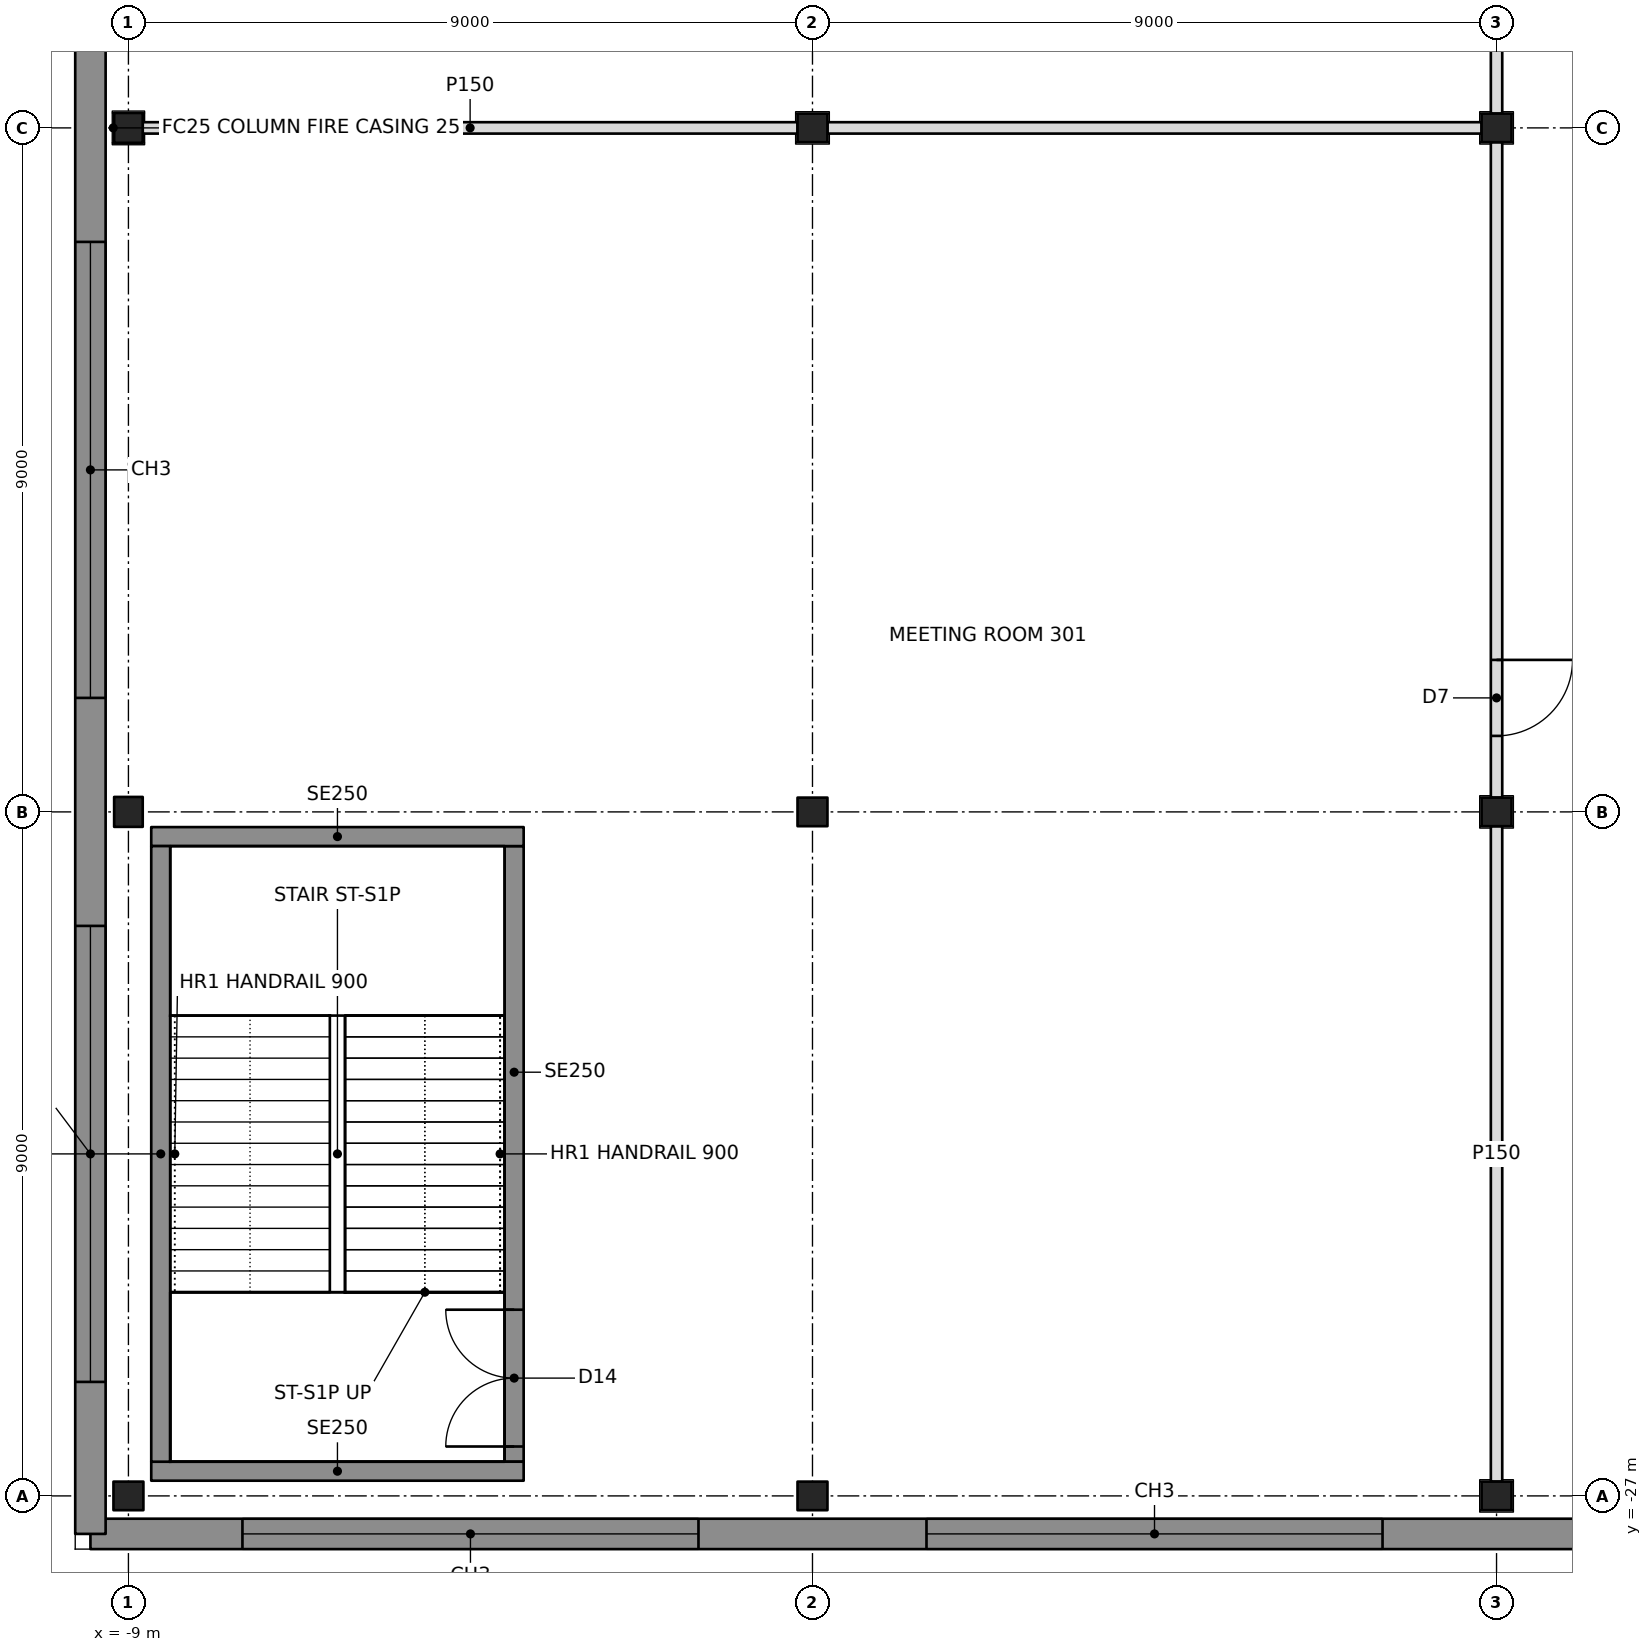
"""IFC4 building model, lengths in metres.
Left out: names, types, materials, properties, quantities, classifications, styles, units other than length and angle.
Written with IfcOpenShell. Run it as: python <this file> out.ifc"""

import sys

from ifc_helpers import new_model, si_unit, direction, frame, frame_2d, origin, origin_2d, place, context, subcontext, project, spatial, rectangle, i_section, extrude, element, fill, save


model = new_model("IFC4")
c1 = context("Model", 3, precision=1e-05, world=origin(), true_north=direction((0.0, 1.0)))
c2 = subcontext(c1, "Body", "Model", "MODEL_VIEW")
j1 = project(units=[si_unit("LENGTHUNIT", "METRE"), si_unit("PLANEANGLEUNIT", "RADIAN")], contexts=[c1])
p1 = place(None, origin())
s1 = spatial("IfcSite", under=j1, at=p1, CompositionType="ELEMENT")
p2 = place(p1, origin())
s2 = spatial("IfcBuilding", under=s1, at=p2, CompositionType="ELEMENT")
p3 = place(p2, frame((0.0, 0.0, 16.0)))
s3 = spatial("IfcBuildingStorey", under=s2, at=p3, CompositionType="ELEMENT", Elevation=16.0)
for number, where, z_axis, x_axis in (
    (1, (-9.0, -27.0, 0.0), (0.0, 0.0, 1.0), (1.0, 0.0, 0.0)),
    (2, (-9.0, -18.0, 0.0), (0.0, 0.0, 1.0), (0.0, 1.0, 0.0)),
    (3, (-9.0, -9.0, 0.0), (0.0, 0.0, 1.0), (0.0, 1.0, 0.0)),
    (4, (0.0, -27.0, 0.0), (0.0, 0.0, 1.0), (1.0, 0.0, 0.0)),
    (5, (0.0, -18.0, 0.0), (0.0, 0.0, 1.0), (1.0, 0.0, 0.0)),
    (6, (0.0, -9.0, 0.0), (0.0, 0.0, 1.0), (1.0, 0.0, 0.0)),
    (7, (9.0, -27.0, 0.0), (0.0, 0.0, 1.0), (1.0, 0.0, 0.0)),
    (8, (9.0, -18.0, 0.0), (0.0, 0.0, 1.0), (1.0, 0.0, 0.0)),
    (9, (9.0, -9.0, 0.0), (0.0, 0.0, 1.0), (1.0, 0.0, 0.0)),
):
    element("IfcColumn", number, at=place(p3, frame(where, z_axis=z_axis, x_axis=x_axis)), inside=s3, PredefinedType="COLUMN", context=c2, shape_type="SweptSolid", body=[
        extrude(i_section(OverallWidth=0.394, OverallDepth=0.376, WebThickness=0.017, FlangeThickness=0.028, at=origin_2d()), origin(), (0.0, 0.0, 1.0), 7.0),
    ])
p4 = place(p3, frame((-9.5, -27.5, 0.0), z_axis=(0.0, 0.0, 1.0), x_axis=(1.0, 0.0, 0.0)))
e10 = element("IfcWall", 10, at=p4, inside=s3, PredefinedType="SOLIDWALL", context=c2, shape_type="SweptSolid", body=[
    extrude(rectangle(XDim=73.0, YDim=0.4, at=frame_2d((36.5, 0.0))), origin(), (0.0, 0.0, 1.0), 6.7),
])
p5 = place(p4, frame((2.0, 0.0, 0.9)))
e11 = element("IfcOpeningElement", 11, at=p5, cuts=e10, PredefinedType="OPENING", context=c2, shape_type="SweptSolid", body=[
    extrude(rectangle(XDim=6.0, YDim=2.6, at=frame_2d((3.0, 1.3))), frame((0.0, 0.21, 0.0), z_axis=(0.0, -1.0, 0.0), x_axis=(1.0, 0.0, 0.0)), (0.0, 0.0, 1.0), 0.42),
])
p6 = place(p4, frame((11.0, 0.0, 0.9)))
e12 = element("IfcOpeningElement", 12, at=p6, cuts=e10, PredefinedType="OPENING", context=c2, shape_type="SweptSolid", body=[
    extrude(rectangle(XDim=6.0, YDim=2.6, at=frame_2d((3.0, 1.3))), frame((0.0, 0.21, 0.0), z_axis=(0.0, -1.0, 0.0), x_axis=(1.0, 0.0, 0.0)), (0.0, 0.0, 1.0), 0.42),
])
p7 = place(p4, frame((20.0, 0.0, 0.9)))
e13 = element("IfcOpeningElement", 13, at=p7, cuts=e10, PredefinedType="OPENING", context=c2, shape_type="SweptSolid", body=[
    extrude(rectangle(XDim=6.0, YDim=2.6, at=frame_2d((3.0, 1.3))), frame((0.0, 0.21, 0.0), z_axis=(0.0, -1.0, 0.0), x_axis=(1.0, 0.0, 0.0)), (0.0, 0.0, 1.0), 0.42),
])
p8 = place(p4, frame((29.0, 0.0, 0.9)))
e14 = element("IfcOpeningElement", 14, at=p8, cuts=e10, PredefinedType="OPENING", context=c2, shape_type="SweptSolid", body=[
    extrude(rectangle(XDim=6.0, YDim=2.6, at=frame_2d((3.0, 1.3))), frame((0.0, 0.21, 0.0), z_axis=(0.0, -1.0, 0.0), x_axis=(1.0, 0.0, 0.0)), (0.0, 0.0, 1.0), 0.42),
])
p9 = place(p4, frame((38.0, 0.0, 0.9)))
e15 = element("IfcOpeningElement", 15, at=p9, cuts=e10, PredefinedType="OPENING", context=c2, shape_type="SweptSolid", body=[
    extrude(rectangle(XDim=6.0, YDim=2.6, at=frame_2d((3.0, 1.3))), frame((0.0, 0.21, 0.0), z_axis=(0.0, -1.0, 0.0), x_axis=(1.0, 0.0, 0.0)), (0.0, 0.0, 1.0), 0.42),
])
p10 = place(p4, frame((47.0, 0.0, 0.9)))
e16 = element("IfcOpeningElement", 16, at=p10, cuts=e10, PredefinedType="OPENING", context=c2, shape_type="SweptSolid", body=[
    extrude(rectangle(XDim=6.0, YDim=2.6, at=frame_2d((3.0, 1.3))), frame((0.0, 0.21, 0.0), z_axis=(0.0, -1.0, 0.0), x_axis=(1.0, 0.0, 0.0)), (0.0, 0.0, 1.0), 0.42),
])
p11 = place(p4, frame((56.0, 0.0, 0.9)))
e17 = element("IfcOpeningElement", 17, at=p11, cuts=e10, PredefinedType="OPENING", context=c2, shape_type="SweptSolid", body=[
    extrude(rectangle(XDim=6.0, YDim=2.6, at=frame_2d((3.0, 1.3))), frame((0.0, 0.21, 0.0), z_axis=(0.0, -1.0, 0.0), x_axis=(1.0, 0.0, 0.0)), (0.0, 0.0, 1.0), 0.42),
])
p12 = place(p4, frame((65.0, 0.0, 0.9)))
e18 = element("IfcOpeningElement", 18, at=p12, cuts=e10, PredefinedType="OPENING", context=c2, shape_type="SweptSolid", body=[
    extrude(rectangle(XDim=6.0, YDim=2.6, at=frame_2d((3.0, 1.3))), frame((0.0, 0.21, 0.0), z_axis=(0.0, -1.0, 0.0), x_axis=(1.0, 0.0, 0.0)), (0.0, 0.0, 1.0), 0.42),
])
p13 = place(p3, frame((-9.5, 45.5, 0.0), z_axis=(0.0, 0.0, 1.0), x_axis=(0.0, -1.0, 0.0)))
e19 = element("IfcWall", 19, at=p13, inside=s3, PredefinedType="SOLIDWALL", context=c2, shape_type="SweptSolid", body=[
    extrude(rectangle(XDim=73.0, YDim=0.4, at=frame_2d((36.5, 0.0))), origin(), (0.0, 0.0, 1.0), 6.7),
])
p14 = place(p13, frame((2.0, 0.0, 0.9)))
e20 = element("IfcOpeningElement", 20, at=p14, cuts=e19, PredefinedType="OPENING", context=c2, shape_type="SweptSolid", body=[
    extrude(rectangle(XDim=6.0, YDim=2.6, at=frame_2d((3.0, 1.3))), frame((0.0, 0.21, 0.0), z_axis=(0.0, -1.0, 0.0), x_axis=(1.0, 0.0, 0.0)), (0.0, 0.0, 1.0), 0.42),
])
p15 = place(p13, frame((11.0, 0.0, 0.9)))
e21 = element("IfcOpeningElement", 21, at=p15, cuts=e19, PredefinedType="OPENING", context=c2, shape_type="SweptSolid", body=[
    extrude(rectangle(XDim=6.0, YDim=2.6, at=frame_2d((3.0, 1.3))), frame((0.0, 0.21, 0.0), z_axis=(0.0, -1.0, 0.0), x_axis=(1.0, 0.0, 0.0)), (0.0, 0.0, 1.0), 0.42),
])
p16 = place(p13, frame((20.0, 0.0, 0.9)))
e22 = element("IfcOpeningElement", 22, at=p16, cuts=e19, PredefinedType="OPENING", context=c2, shape_type="SweptSolid", body=[
    extrude(rectangle(XDim=6.0, YDim=2.6, at=frame_2d((3.0, 1.3))), frame((0.0, 0.21, 0.0), z_axis=(0.0, -1.0, 0.0), x_axis=(1.0, 0.0, 0.0)), (0.0, 0.0, 1.0), 0.42),
])
p17 = place(p13, frame((29.0, 0.0, 0.9)))
e23 = element("IfcOpeningElement", 23, at=p17, cuts=e19, PredefinedType="OPENING", context=c2, shape_type="SweptSolid", body=[
    extrude(rectangle(XDim=6.0, YDim=2.6, at=frame_2d((3.0, 1.3))), frame((0.0, 0.21, 0.0), z_axis=(0.0, -1.0, 0.0), x_axis=(1.0, 0.0, 0.0)), (0.0, 0.0, 1.0), 0.42),
])
p18 = place(p13, frame((38.0, 0.0, 0.9)))
e24 = element("IfcOpeningElement", 24, at=p18, cuts=e19, PredefinedType="OPENING", context=c2, shape_type="SweptSolid", body=[
    extrude(rectangle(XDim=6.0, YDim=2.6, at=frame_2d((3.0, 1.3))), frame((0.0, 0.21, 0.0), z_axis=(0.0, -1.0, 0.0), x_axis=(1.0, 0.0, 0.0)), (0.0, 0.0, 1.0), 0.42),
])
p19 = place(p13, frame((47.0, 0.0, 0.9)))
e25 = element("IfcOpeningElement", 25, at=p19, cuts=e19, PredefinedType="OPENING", context=c2, shape_type="SweptSolid", body=[
    extrude(rectangle(XDim=6.0, YDim=2.6, at=frame_2d((3.0, 1.3))), frame((0.0, 0.21, 0.0), z_axis=(0.0, -1.0, 0.0), x_axis=(1.0, 0.0, 0.0)), (0.0, 0.0, 1.0), 0.42),
])
p20 = place(p13, frame((56.0, 0.0, 0.9)))
e26 = element("IfcOpeningElement", 26, at=p20, cuts=e19, PredefinedType="OPENING", context=c2, shape_type="SweptSolid", body=[
    extrude(rectangle(XDim=6.0, YDim=2.6, at=frame_2d((3.0, 1.3))), frame((0.0, 0.21, 0.0), z_axis=(0.0, -1.0, 0.0), x_axis=(1.0, 0.0, 0.0)), (0.0, 0.0, 1.0), 0.42),
])
p21 = place(p13, frame((65.0, 0.0, 0.9)))
e27 = element("IfcOpeningElement", 27, at=p21, cuts=e19, PredefinedType="OPENING", context=c2, shape_type="SweptSolid", body=[
    extrude(rectangle(XDim=6.0, YDim=2.6, at=frame_2d((3.0, 1.3))), frame((0.0, 0.21, 0.0), z_axis=(0.0, -1.0, 0.0), x_axis=(1.0, 0.0, 0.0)), (0.0, 0.0, 1.0), 0.42),
])
p22 = place(p3, frame((-8.812, -9.0, 0.0), z_axis=(0.0, 0.0, 1.0), x_axis=(1.0, 0.0, 0.0)))
e28 = element("IfcWall", 28, at=p22, inside=s3, PredefinedType="PARTITIONING", context=c2, shape_type="SweptSolid", body=[
    extrude(rectangle(XDim=8.615, YDim=0.15, at=frame_2d((4.308, 0.0))), origin(), (0.0, 0.0, 1.0), 5.753),
])
p23 = place(p3, frame((0.197, -9.0, 0.0), z_axis=(0.0, 0.0, 1.0), x_axis=(1.0, 0.0, 0.0)))
e29 = element("IfcWall", 29, at=p23, inside=s3, PredefinedType="PARTITIONING", context=c2, shape_type="SweptSolid", body=[
    extrude(rectangle(XDim=8.606, YDim=0.15, at=frame_2d((4.303, 0.0))), origin(), (0.0, 0.0, 1.0), 5.753),
])
p24 = place(p3, frame((9.0, -9.188, 0.0), z_axis=(0.0, 0.0, 1.0), x_axis=(0.0, -1.0, 0.0)))
e30 = element("IfcWall", 30, at=p24, inside=s3, PredefinedType="PARTITIONING", context=c2, shape_type="SweptSolid", body=[
    extrude(rectangle(XDim=8.624, YDim=0.15, at=frame_2d((4.312, 0.0))), origin(), (0.0, 0.0, 1.0), 5.753),
])
p25 = place(p24, frame((6.812, 0.0, 0.0)))
e31 = element("IfcOpeningElement", 31, at=p25, cuts=e30, PredefinedType="OPENING", context=c2, shape_type="SweptSolid", body=[
    extrude(rectangle(XDim=1.0, YDim=2.1, at=frame_2d((0.5, 1.05))), frame((0.0, 0.085, 0.0), z_axis=(0.0, -1.0, 0.0), x_axis=(1.0, 0.0, 0.0)), (0.0, 0.0, 1.0), 0.17),
])
p26 = place(p3, frame((9.0, -18.188, 0.0), z_axis=(0.0, 0.0, 1.0), x_axis=(0.0, -1.0, 0.0)))
e32 = element("IfcWall", 32, at=p26, inside=s3, PredefinedType="PARTITIONING", context=c2, shape_type="SweptSolid", body=[
    extrude(rectangle(XDim=8.624, YDim=0.15, at=frame_2d((4.312, 0.0))), origin(), (0.0, 0.0, 1.0), 5.753),
])
p27 = place(p3, frame((9.0, -0.4, 0.0), z_axis=(0.0, 0.0, 1.0), x_axis=(0.0, -1.0, 0.0)))
e33 = element("IfcWall", 33, at=p27, inside=s3, PredefinedType="PARTITIONING", context=c2, shape_type="SweptSolid", body=[
    extrude(rectangle(XDim=8.412, YDim=0.15, at=frame_2d((4.206, 0.0))), origin(), (0.0, 0.0, 1.0), 5.753),
])
p28 = place(p27, frame((0.6, 0.0, 0.0)))
e34 = element("IfcOpeningElement", 34, at=p28, cuts=e33, PredefinedType="OPENING", context=c2, shape_type="SweptSolid", body=[
    extrude(rectangle(XDim=1.0, YDim=2.1, at=frame_2d((0.5, 1.05))), frame((0.0, 0.085, 0.0), z_axis=(0.0, -1.0, 0.0), x_axis=(1.0, 0.0, 0.0)), (0.0, 0.0, 1.0), 0.17),
])
for number, where, z_axis, x_axis in (
    (35, (-8.7, -26.675, 0.0), (0.0, 0.0, 1.0), (1.0, 0.0, 0.0)),
    (36, (-8.7, -18.325, 0.0), (0.0, 0.0, 1.0), (1.0, 0.0, 0.0)),
):
    element("IfcWall", number, at=place(p3, frame(where, z_axis=z_axis, x_axis=x_axis)), inside=s3, PredefinedType="SOLIDWALL", context=c2, shape_type="SweptSolid", body=[
        extrude(rectangle(XDim=4.9, YDim=0.25, at=frame_2d((2.45, 0.0))), origin(), (0.0, 0.0, 1.0), 6.7),
    ])
p29 = place(p3, frame((-8.575, -26.55, 0.0), z_axis=(0.0, 0.0, 1.0), x_axis=(0.0, 1.0, 0.0)))
e37 = element("IfcWall", 37, at=p29, inside=s3, PredefinedType="SOLIDWALL", context=c2, shape_type="SweptSolid", body=[
    extrude(rectangle(XDim=8.1, YDim=0.25, at=frame_2d((4.05, 0.0))), origin(), (0.0, 0.0, 1.0), 6.7),
])
p30 = place(p3, frame((-3.925, -26.55, 0.0), z_axis=(0.0, 0.0, 1.0), x_axis=(0.0, 1.0, 0.0)))
e38 = element("IfcWall", 38, at=p30, inside=s3, PredefinedType="SOLIDWALL", context=c2, shape_type="SweptSolid", body=[
    extrude(rectangle(XDim=8.1, YDim=0.25, at=frame_2d((4.05, 0.0))), origin(), (0.0, 0.0, 1.0), 6.7),
])
p31 = place(p30, frame((0.2, 0.0, 0.0)))
e39 = element("IfcOpeningElement", 39, at=p31, cuts=e38, PredefinedType="OPENING", context=c2, shape_type="SweptSolid", body=[
    extrude(rectangle(XDim=1.8, YDim=2.1, at=frame_2d((0.9, 1.05))), frame((0.0, 0.135, 0.0), z_axis=(0.0, -1.0, 0.0), x_axis=(1.0, 0.0, 0.0)), (0.0, 0.0, 1.0), 0.27),
])
p32 = place(p5, origin())
e40 = element("IfcWindow", 40, at=p32, inside=s3, PartitioningType="TRIPLE_PANEL_VERTICAL", PredefinedType="WINDOW", context=c2, shape_type="SweptSolid", body=[
    extrude(rectangle(XDim=6.0, YDim=2.6, at=frame_2d((3.0, 1.3))), frame((0.0, 0.03, 0.0), z_axis=(0.0, -1.0, 0.0), x_axis=(1.0, 0.0, 0.0)), (0.0, 0.0, 1.0), 0.06),
])
fill(e11, e40)
p33 = place(p6, origin())
e41 = element("IfcWindow", 41, at=p33, inside=s3, PartitioningType="TRIPLE_PANEL_VERTICAL", PredefinedType="WINDOW", context=c2, shape_type="SweptSolid", body=[
    extrude(rectangle(XDim=6.0, YDim=2.6, at=frame_2d((3.0, 1.3))), frame((0.0, 0.03, 0.0), z_axis=(0.0, -1.0, 0.0), x_axis=(1.0, 0.0, 0.0)), (0.0, 0.0, 1.0), 0.06),
])
fill(e12, e41)
p34 = place(p20, origin())
e42 = element("IfcWindow", 42, at=p34, inside=s3, PartitioningType="TRIPLE_PANEL_VERTICAL", PredefinedType="WINDOW", context=c2, shape_type="SweptSolid", body=[
    extrude(rectangle(XDim=6.0, YDim=2.6, at=frame_2d((3.0, 1.3))), frame((0.0, 0.03, 0.0), z_axis=(0.0, -1.0, 0.0), x_axis=(1.0, 0.0, 0.0)), (0.0, 0.0, 1.0), 0.06),
])
fill(e26, e42)
p35 = place(p21, origin())
e43 = element("IfcWindow", 43, at=p35, inside=s3, PartitioningType="TRIPLE_PANEL_VERTICAL", PredefinedType="WINDOW", context=c2, shape_type="SweptSolid", body=[
    extrude(rectangle(XDim=6.0, YDim=2.6, at=frame_2d((3.0, 1.3))), frame((0.0, 0.03, 0.0), z_axis=(0.0, -1.0, 0.0), x_axis=(1.0, 0.0, 0.0)), (0.0, 0.0, 1.0), 0.06),
])
fill(e27, e43)
p36 = place(p25, origin())
e44 = element("IfcDoor", 44, at=p36, inside=s3, OperationType="SINGLE_SWING_LEFT", PredefinedType="DOOR", context=c2, shape_type="SweptSolid", body=[
    extrude(rectangle(XDim=1.0, YDim=2.1, at=frame_2d((0.5, 1.05))), frame((0.0, 0.025, 0.0), z_axis=(0.0, -1.0, 0.0), x_axis=(1.0, 0.0, 0.0)), (0.0, 0.0, 1.0), 0.05),
])
fill(e31, e44)
p37 = place(p31, origin())
e45 = element("IfcDoor", 45, at=p37, inside=s3, OperationType="DOUBLE_DOOR_SINGLE_SWING", PredefinedType="DOOR", context=c2, shape_type="SweptSolid", body=[
    extrude(rectangle(XDim=1.8, YDim=2.1, at=frame_2d((0.9, 1.05))), frame((0.0, 0.025, 0.0), z_axis=(0.0, -1.0, 0.0), x_axis=(1.0, 0.0, 0.0)), (0.0, 0.0, 1.0), 0.05),
])
fill(e39, e45)
save(model, sys.argv[1])
